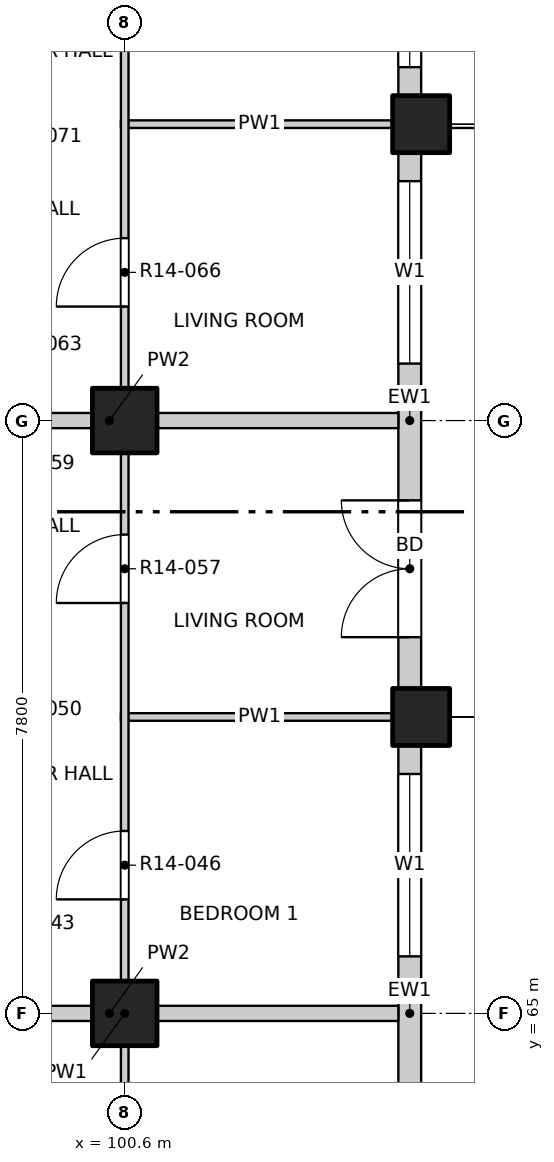
"""IFC4 building model, lengths in metres.
Left out: names, types, materials, properties, quantities, classifications, styles, units other than length and angle.
Written with IfcOpenShell. Run it as: python <this file> out.ifc"""

import sys

from ifc_helpers import new_model, si_unit, direction, frame, frame_2d, origin, origin_2d, place, context, subcontext, project, spatial, rectangle, extrude, element, fill, save


model = new_model("IFC4")
c1 = context("Model", 3, precision=1e-05, world=origin(), true_north=direction((0.0, 1.0)))
c2 = subcontext(c1, "Body", "Model", "MODEL_VIEW")
j1 = project(units=[si_unit("LENGTHUNIT", "METRE"), si_unit("PLANEANGLEUNIT", "RADIAN")], contexts=[c1])
p1 = place(None, origin())
s1 = spatial("IfcSite", under=j1, at=p1, CompositionType="ELEMENT")
p2 = place(p1, origin())
s2 = spatial("IfcBuilding", under=s1, at=p2, CompositionType="ELEMENT")
p3 = place(p2, frame((0.0, 0.0, 155.4)))
s3 = spatial("IfcBuildingStorey", under=s2, at=p3, CompositionType="ELEMENT", Elevation=155.4)
for number, where, z_axis, x_axis in (
    (1, (104.5, 68.9, -0.25), (0.0, 0.0, 1.0), (1.0, 0.0, 0.0)),
    (2, (104.5, 76.7, -0.25), (0.0, 0.0, 1.0), (1.0, 0.0, 0.0)),
):
    element("IfcColumn", number, at=place(p3, frame(where, z_axis=z_axis, x_axis=x_axis)), inside=s3, PredefinedType="COLUMN", context=c2, shape_type="SweptSolid", body=[
        extrude(rectangle(XDim=0.75, YDim=0.75, at=origin_2d()), origin(), (0.0, 0.0, 1.0), 3.4),
    ])
for number, where, z_axis, x_axis in (
    (3, (100.6, 65.0, -0.25), (0.0, 0.0, 1.0), (1.0, 0.0, 0.0)),
    (4, (100.6, 72.8, -0.25), (0.0, 0.0, 1.0), (1.0, 0.0, 0.0)),
):
    element("IfcColumn", number, at=place(p3, frame(where, z_axis=z_axis, x_axis=x_axis)), inside=s3, PredefinedType="COLUMN", context=c2, shape_type="SweptSolid", body=[
        extrude(rectangle(XDim=0.85, YDim=0.85, at=origin_2d()), origin(), (0.0, 0.0, 1.0), 3.4),
    ])
p4 = place(p3, frame((104.35, 61.475, 0.0), z_axis=(0.0, 0.0, 1.0), x_axis=(0.0, 1.0, 0.0)))
e5 = element("IfcWall", 5, at=p4, inside=s3, PredefinedType="SOLIDWALL", context=c2, shape_type="SweptSolid", body=[
    extrude(rectangle(XDim=7.05, YDim=0.3, at=frame_2d((3.525, 0.0))), origin(), (0.0, 0.0, 1.0), 2.7),
])
p5 = place(p4, frame((0.675, 0.0, 0.0)))
e6 = element("IfcOpeningElement", 6, at=p5, cuts=e5, PredefinedType="OPENING", context=c2, shape_type="SweptSolid", body=[
    extrude(rectangle(XDim=1.8, YDim=2.4, at=frame_2d((0.9, 1.2))), frame((0.0, 0.16, 0.0), z_axis=(0.0, -1.0, 0.0), x_axis=(1.0, 0.0, 0.0)), (0.0, 0.0, 1.0), 0.32),
])
p6 = place(p4, frame((4.275, 0.0, 0.9)))
e7 = element("IfcOpeningElement", 7, at=p6, cuts=e5, PredefinedType="OPENING", context=c2, shape_type="SweptSolid", body=[
    extrude(rectangle(XDim=2.4, YDim=1.8, at=frame_2d((1.2, 0.9))), frame((0.0, 0.16, 0.0), z_axis=(0.0, -1.0, 0.0), x_axis=(1.0, 0.0, 0.0)), (0.0, 0.0, 1.0), 0.32),
])
p7 = place(p3, frame((104.35, 69.275, 0.0), z_axis=(0.0, 0.0, 1.0), x_axis=(0.0, 1.0, 0.0)))
e8 = element("IfcWall", 8, at=p7, inside=s3, PredefinedType="SOLIDWALL", context=c2, shape_type="SweptSolid", body=[
    extrude(rectangle(XDim=7.05, YDim=0.3, at=frame_2d((3.525, 0.0))), origin(), (0.0, 0.0, 1.0), 2.7),
])
p8 = place(p7, frame((0.675, 0.0, 0.0)))
e9 = element("IfcOpeningElement", 9, at=p8, cuts=e8, PredefinedType="OPENING", context=c2, shape_type="SweptSolid", body=[
    extrude(rectangle(XDim=1.8, YDim=2.4, at=frame_2d((0.9, 1.2))), frame((0.0, 0.16, 0.0), z_axis=(0.0, -1.0, 0.0), x_axis=(1.0, 0.0, 0.0)), (0.0, 0.0, 1.0), 0.32),
])
p9 = place(p7, frame((4.275, 0.0, 0.9)))
e10 = element("IfcOpeningElement", 10, at=p9, cuts=e8, PredefinedType="OPENING", context=c2, shape_type="SweptSolid", body=[
    extrude(rectangle(XDim=2.4, YDim=1.8, at=frame_2d((1.2, 0.9))), frame((0.0, 0.16, 0.0), z_axis=(0.0, -1.0, 0.0), x_axis=(1.0, 0.0, 0.0)), (0.0, 0.0, 1.0), 0.32),
])
p10 = place(p3, frame((104.35, 77.075, 0.0), z_axis=(0.0, 0.0, 1.0), x_axis=(0.0, 1.0, 0.0)))
e11 = element("IfcWall", 11, at=p10, inside=s3, PredefinedType="SOLIDWALL", context=c2, shape_type="SweptSolid", body=[
    extrude(rectangle(XDim=3.525, YDim=0.3, at=frame_2d((1.763, 0.0))), origin(), (0.0, 0.0, 1.0), 2.7),
])
p11 = place(p10, frame((0.375, 0.0, 0.9)))
e12 = element("IfcOpeningElement", 12, at=p11, cuts=e11, PredefinedType="OPENING", context=c2, shape_type="SweptSolid", body=[
    extrude(rectangle(XDim=2.4, YDim=1.8, at=frame_2d((1.2, 0.9))), frame((0.0, 0.16, 0.0), z_axis=(0.0, -1.0, 0.0), x_axis=(1.0, 0.0, 0.0)), (0.0, 0.0, 1.0), 0.32),
])
p12 = place(p3, frame((96.6, 65.0, 0.0), z_axis=(0.0, 0.0, 1.0), x_axis=(1.0, 0.0, 0.0)))
e13 = element("IfcWall", 13, at=p12, inside=s3, PredefinedType="PARTITIONING", context=c2, shape_type="SweptSolid", body=[
    extrude(rectangle(XDim=7.6, YDim=0.2, at=frame_2d((3.8, 0.0))), origin(), (0.0, 0.0, 1.0), 3.15),
])
p13 = place(p3, frame((100.55, 68.9, 0.0), z_axis=(0.0, 0.0, 1.0), x_axis=(1.0, 0.0, 0.0)))
e14 = element("IfcWall", 14, at=p13, inside=s3, PredefinedType="PARTITIONING", context=c2, shape_type="SweptSolid", body=[
    extrude(rectangle(XDim=3.65, YDim=0.1, at=frame_2d((1.825, 0.0))), origin(), (0.0, 0.0, 1.0), 2.55),
])
p14 = place(p3, frame((96.6, 72.8, 0.0), z_axis=(0.0, 0.0, 1.0), x_axis=(1.0, 0.0, 0.0)))
e15 = element("IfcWall", 15, at=p14, inside=s3, PredefinedType="PARTITIONING", context=c2, shape_type="SweptSolid", body=[
    extrude(rectangle(XDim=7.6, YDim=0.2, at=frame_2d((3.8, 0.0))), origin(), (0.0, 0.0, 1.0), 3.15),
])
p15 = place(p3, frame((100.55, 76.7, 0.0), z_axis=(0.0, 0.0, 1.0), x_axis=(1.0, 0.0, 0.0)))
e16 = element("IfcWall", 16, at=p15, inside=s3, PredefinedType="PARTITIONING", context=c2, shape_type="SweptSolid", body=[
    extrude(rectangle(XDim=3.65, YDim=0.1, at=frame_2d((1.825, 0.0))), origin(), (0.0, 0.0, 1.0), 2.55),
])
p16 = place(p3, frame((100.6, 45.8, 0.0), z_axis=(0.0, 0.0, 1.0), x_axis=(0.0, 1.0, 0.0)))
e17 = element("IfcWall", 17, at=p16, inside=s3, PredefinedType="PARTITIONING", context=c2, shape_type="SweptSolid", body=[
    extrude(rectangle(XDim=38.4, YDim=0.1, at=frame_2d((19.2, 0.0))), origin(), (0.0, 0.0, 1.0), 3.15),
])
p17 = place(p16, frame((1.05, 0.0, 0.0)))
e18 = element("IfcOpeningElement", 18, at=p17, cuts=e17, PredefinedType="OPENING", context=c2, shape_type="SweptSolid", body=[
    extrude(rectangle(XDim=1.2, YDim=2.1, at=frame_2d((0.6, 1.05))), frame((0.0, 0.06, 0.0), z_axis=(0.0, -1.0, 0.0), x_axis=(1.0, 0.0, 0.0)), (0.0, 0.0, 1.0), 0.12),
])
p18 = place(p16, frame((5.1, 0.0, 0.0)))
e19 = element("IfcOpeningElement", 19, at=p18, cuts=e17, PredefinedType="OPENING", context=c2, shape_type="SweptSolid", body=[
    extrude(rectangle(XDim=0.9, YDim=2.1, at=frame_2d((0.45, 1.05))), frame((0.0, 0.06, 0.0), z_axis=(0.0, -1.0, 0.0), x_axis=(1.0, 0.0, 0.0)), (0.0, 0.0, 1.0), 0.12),
])
p19 = place(p16, frame((9.0, 0.0, 0.0)))
e20 = element("IfcOpeningElement", 20, at=p19, cuts=e17, PredefinedType="OPENING", context=c2, shape_type="SweptSolid", body=[
    extrude(rectangle(XDim=0.9, YDim=2.1, at=frame_2d((0.45, 1.05))), frame((0.0, 0.06, 0.0), z_axis=(0.0, -1.0, 0.0), x_axis=(1.0, 0.0, 0.0)), (0.0, 0.0, 1.0), 0.12),
])
p20 = place(p16, frame((12.9, 0.0, 0.0)))
e21 = element("IfcOpeningElement", 21, at=p20, cuts=e17, PredefinedType="OPENING", context=c2, shape_type="SweptSolid", body=[
    extrude(rectangle(XDim=0.9, YDim=2.1, at=frame_2d((0.45, 1.05))), frame((0.0, 0.06, 0.0), z_axis=(0.0, -1.0, 0.0), x_axis=(1.0, 0.0, 0.0)), (0.0, 0.0, 1.0), 0.12),
])
p21 = place(p16, frame((16.8, 0.0, 0.0)))
e22 = element("IfcOpeningElement", 22, at=p21, cuts=e17, PredefinedType="OPENING", context=c2, shape_type="SweptSolid", body=[
    extrude(rectangle(XDim=0.9, YDim=2.1, at=frame_2d((0.45, 1.05))), frame((0.0, 0.06, 0.0), z_axis=(0.0, -1.0, 0.0), x_axis=(1.0, 0.0, 0.0)), (0.0, 0.0, 1.0), 0.12),
])
p22 = place(p16, frame((20.7, 0.0, 0.0)))
e23 = element("IfcOpeningElement", 23, at=p22, cuts=e17, PredefinedType="OPENING", context=c2, shape_type="SweptSolid", body=[
    extrude(rectangle(XDim=0.9, YDim=2.1, at=frame_2d((0.45, 1.05))), frame((0.0, 0.06, 0.0), z_axis=(0.0, -1.0, 0.0), x_axis=(1.0, 0.0, 0.0)), (0.0, 0.0, 1.0), 0.12),
])
p23 = place(p16, frame((24.6, 0.0, 0.0)))
e24 = element("IfcOpeningElement", 24, at=p23, cuts=e17, PredefinedType="OPENING", context=c2, shape_type="SweptSolid", body=[
    extrude(rectangle(XDim=0.9, YDim=2.1, at=frame_2d((0.45, 1.05))), frame((0.0, 0.06, 0.0), z_axis=(0.0, -1.0, 0.0), x_axis=(1.0, 0.0, 0.0)), (0.0, 0.0, 1.0), 0.12),
])
p24 = place(p16, frame((28.5, 0.0, 0.0)))
e25 = element("IfcOpeningElement", 25, at=p24, cuts=e17, PredefinedType="OPENING", context=c2, shape_type="SweptSolid", body=[
    extrude(rectangle(XDim=0.9, YDim=2.1, at=frame_2d((0.45, 1.05))), frame((0.0, 0.06, 0.0), z_axis=(0.0, -1.0, 0.0), x_axis=(1.0, 0.0, 0.0)), (0.0, 0.0, 1.0), 0.12),
])
p25 = place(p16, frame((32.4, 0.0, 0.0)))
e26 = element("IfcOpeningElement", 26, at=p25, cuts=e17, PredefinedType="OPENING", context=c2, shape_type="SweptSolid", body=[
    extrude(rectangle(XDim=0.9, YDim=2.1, at=frame_2d((0.45, 1.05))), frame((0.0, 0.06, 0.0), z_axis=(0.0, -1.0, 0.0), x_axis=(1.0, 0.0, 0.0)), (0.0, 0.0, 1.0), 0.12),
])
p26 = place(p16, frame((36.15, 0.0, 0.0)))
e27 = element("IfcOpeningElement", 27, at=p26, cuts=e17, PredefinedType="OPENING", context=c2, shape_type="SweptSolid", body=[
    extrude(rectangle(XDim=1.2, YDim=2.1, at=frame_2d((0.6, 1.05))), frame((0.0, 0.06, 0.0), z_axis=(0.0, -1.0, 0.0), x_axis=(1.0, 0.0, 0.0)), (0.0, 0.0, 1.0), 0.12),
])
p27 = place(p6, origin())
e28 = element("IfcWindow", 28, at=p27, inside=s3, PartitioningType="DOUBLE_PANEL_VERTICAL", PredefinedType="WINDOW", context=c2, shape_type="SweptSolid", body=[
    extrude(rectangle(XDim=2.4, YDim=1.8, at=frame_2d((1.2, 0.9))), frame((0.0, 0.03, 0.0), z_axis=(0.0, -1.0, 0.0), x_axis=(1.0, 0.0, 0.0)), (0.0, 0.0, 1.0), 0.06),
])
fill(e7, e28)
p28 = place(p8, origin())
e29 = element("IfcDoor", 29, at=p28, inside=s3, OperationType="DOUBLE_DOOR_SINGLE_SWING", PredefinedType="DOOR", context=c2, shape_type="SweptSolid", body=[
    extrude(rectangle(XDim=1.8, YDim=2.4, at=frame_2d((0.9, 1.2))), frame((0.0, 0.025, 0.0), z_axis=(0.0, -1.0, 0.0), x_axis=(1.0, 0.0, 0.0)), (0.0, 0.0, 1.0), 0.05),
])
fill(e9, e29)
p29 = place(p9, origin())
e30 = element("IfcWindow", 30, at=p29, inside=s3, PartitioningType="DOUBLE_PANEL_VERTICAL", PredefinedType="WINDOW", context=c2, shape_type="SweptSolid", body=[
    extrude(rectangle(XDim=2.4, YDim=1.8, at=frame_2d((1.2, 0.9))), frame((0.0, 0.03, 0.0), z_axis=(0.0, -1.0, 0.0), x_axis=(1.0, 0.0, 0.0)), (0.0, 0.0, 1.0), 0.06),
])
fill(e10, e30)
p30 = place(p11, origin())
e31 = element("IfcWindow", 31, at=p30, inside=s3, PartitioningType="DOUBLE_PANEL_VERTICAL", PredefinedType="WINDOW", context=c2, shape_type="SweptSolid", body=[
    extrude(rectangle(XDim=2.4, YDim=1.8, at=frame_2d((1.2, 0.9))), frame((0.0, 0.03, 0.0), z_axis=(0.0, -1.0, 0.0), x_axis=(1.0, 0.0, 0.0)), (0.0, 0.0, 1.0), 0.06),
])
fill(e12, e31)
p31 = place(p22, origin())
e32 = element("IfcDoor", 32, at=p31, inside=s3, OperationType="SINGLE_SWING_LEFT", PredefinedType="DOOR", context=c2, shape_type="SweptSolid", body=[
    extrude(rectangle(XDim=0.9, YDim=2.1, at=frame_2d((0.45, 1.05))), frame((0.0, 0.025, 0.0), z_axis=(0.0, -1.0, 0.0), x_axis=(1.0, 0.0, 0.0)), (0.0, 0.0, 1.0), 0.05),
])
fill(e23, e32)
p32 = place(p23, origin())
e33 = element("IfcDoor", 33, at=p32, inside=s3, OperationType="SINGLE_SWING_LEFT", PredefinedType="DOOR", context=c2, shape_type="SweptSolid", body=[
    extrude(rectangle(XDim=0.9, YDim=2.1, at=frame_2d((0.45, 1.05))), frame((0.0, 0.025, 0.0), z_axis=(0.0, -1.0, 0.0), x_axis=(1.0, 0.0, 0.0)), (0.0, 0.0, 1.0), 0.05),
])
fill(e24, e33)
p33 = place(p24, origin())
e34 = element("IfcDoor", 34, at=p33, inside=s3, OperationType="SINGLE_SWING_LEFT", PredefinedType="DOOR", context=c2, shape_type="SweptSolid", body=[
    extrude(rectangle(XDim=0.9, YDim=2.1, at=frame_2d((0.45, 1.05))), frame((0.0, 0.025, 0.0), z_axis=(0.0, -1.0, 0.0), x_axis=(1.0, 0.0, 0.0)), (0.0, 0.0, 1.0), 0.05),
])
fill(e25, e34)
save(model, sys.argv[1])
